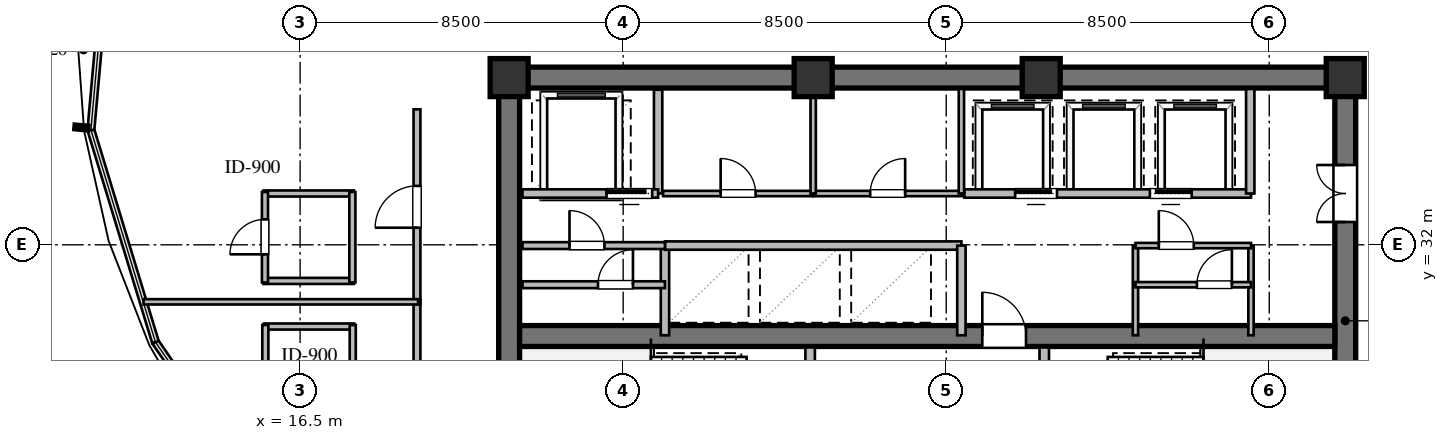
"""IFC4 building model, lengths in metres.
Left out: names, types, materials, properties, quantities, classifications, styles, units other than length and angle.
Written with IfcOpenShell. Run it as: python <this file> out.ifc"""

import sys

from ifc_helpers import new_model, si_unit, direction, frame, frame_2d, origin, origin_2d, place, context, subcontext, project, spatial, rectangle, extrude, element, fill, save


model = new_model("IFC4")
c1 = context("Model", 3, precision=1e-05, world=origin(), true_north=direction((0.0, 1.0)))
c2 = subcontext(c1, "Body", "Model", "MODEL_VIEW")
j1 = project(units=[si_unit("LENGTHUNIT", "METRE"), si_unit("PLANEANGLEUNIT", "RADIAN")], contexts=[c1])
p1 = place(None, origin())
s1 = spatial("IfcSite", under=j1, at=p1, CompositionType="ELEMENT")
p2 = place(p1, origin())
s2 = spatial("IfcBuilding", under=s1, at=p2, CompositionType="ELEMENT")
p3 = place(p2, frame((0.0, 0.0, 153.0)))
s3 = spatial("IfcBuildingStorey", under=s2, at=p3, CompositionType="ELEMENT", Elevation=153.0)
p4 = place(p3, frame((21.725, 36.4, 0.0), z_axis=(0.0, 0.0, 1.0), x_axis=(1.0, 0.0, 0.0)))
e1 = element("IfcWall", 1, at=p4, inside=s3, PredefinedType="SHEAR", context=c2, shape_type="SweptSolid", body=[
    extrude(rectangle(XDim=22.55, YDim=0.55, at=frame_2d((11.275, 0.0))), origin(), (0.0, 0.0, 1.0), 3.36),
])
p5 = place(p3, frame((22.0, 23.875, 0.0), z_axis=(0.0, 0.0, 1.0), x_axis=(0.0, 1.0, 0.0)))
e2 = element("IfcWall", 2, at=p5, inside=s3, PredefinedType="SHEAR", context=c2, shape_type="SweptSolid", body=[
    extrude(rectangle(XDim=12.25, YDim=0.55, at=frame_2d((6.125, 0.0))), origin(), (0.0, 0.0, 1.0), 3.36),
])
p6 = place(p3, frame((44.0, 23.875, 0.0), z_axis=(0.0, 0.0, 1.0), x_axis=(0.0, 1.0, 0.0)))
e3 = element("IfcWall", 3, at=p6, inside=s3, PredefinedType="SHEAR", context=c2, shape_type="SweptSolid", body=[
    extrude(rectangle(XDim=12.25, YDim=0.55, at=frame_2d((6.125, 0.0))), origin(), (0.0, 0.0, 1.0), 3.36),
])
p7 = place(p6, frame((8.725, 0.0, 0.0)))
e4 = element("IfcOpeningElement", 4, at=p7, cuts=e3, PredefinedType="OPENING", context=c2, shape_type="SweptSolid", body=[
    extrude(rectangle(XDim=1.5, YDim=2.15, at=frame_2d((0.75, 1.075))), frame((0.0, 0.285, 0.0), z_axis=(0.0, -1.0, 0.0), x_axis=(1.0, 0.0, 0.0)), (0.0, 0.0, 1.0), 0.57),
])
p8 = place(p3, frame((22.275, 29.6, 0.0), z_axis=(0.0, 0.0, 1.0), x_axis=(1.0, 0.0, 0.0)))
e5 = element("IfcWall", 5, at=p8, inside=s3, PredefinedType="SHEAR", context=c2, shape_type="SweptSolid", body=[
    extrude(rectangle(XDim=21.45, YDim=0.55, at=frame_2d((10.725, 0.0))), origin(), (0.0, 0.0, 1.0), 3.36),
])
p9 = place(p8, frame((12.175, 0.0, 0.0)))
e6 = element("IfcOpeningElement", 6, at=p9, cuts=e5, PredefinedType="OPENING", context=c2, shape_type="SweptSolid", body=[
    extrude(rectangle(XDim=1.15, YDim=2.1, at=frame_2d((0.575, 1.05))), frame((0.0, 0.285, 0.0), z_axis=(0.0, -1.0, 0.0), x_axis=(1.0, 0.0, 0.0)), (0.0, 0.0, 1.0), 0.57),
])
for number, where, z_axis, x_axis in (
    (7, (44.0, 36.4, 0.0), (0.0, 0.0, 1.0), (1.0, 0.0, 0.0)),
    (8, (36.0, 36.4, 0.0), (0.0, 0.0, 1.0), (1.0, 0.0, 0.0)),
    (9, (30.0, 36.4, 0.0), (0.0, 0.0, 1.0), (1.0, 0.0, 0.0)),
    (10, (22.0, 36.4, 0.0), (0.0, 0.0, 1.0), (1.0, 0.0, 0.0)),
):
    element("IfcColumn", number, at=place(p3, frame(where, z_axis=z_axis, x_axis=x_axis)), inside=s3, PredefinedType="COLUMN", context=c2, shape_type="SweptSolid", body=[
        extrude(rectangle(XDim=1.0, YDim=1.0, at=origin_2d()), origin(), (0.0, 0.0, 1.0), 3.6),
    ])
p10 = place(p3, frame((29.92, 23.9, 0.0), z_axis=(0.0, 0.0, 1.0), x_axis=(0.0, 1.0, 0.0)))
e11 = element("IfcWall", 11, at=p10, inside=s3, PredefinedType="SOLIDWALL", context=c2, shape_type="SweptSolid", body=[
    extrude(rectangle(XDim=5.4, YDim=0.25, at=frame_2d((2.7, 0.0))), origin(), (0.0, 0.0, 1.0), 2.806),
])
p11 = place(p10, frame((3.421, 0.0, 0.0)))
e12 = element("IfcOpeningElement", 12, at=p11, cuts=e11, PredefinedType="OPENING", context=c2, shape_type="SweptSolid", body=[
    extrude(rectangle(XDim=1.15, YDim=2.1, at=frame_2d((0.575, 1.05))), frame((0.0, 0.135, 0.0), z_axis=(0.0, -1.0, 0.0), x_axis=(1.0, 0.0, 0.0)), (0.0, 0.0, 1.0), 0.27),
])
p12 = place(p3, frame((36.08, 23.9, 0.0), z_axis=(0.0, 0.0, 1.0), x_axis=(0.0, 1.0, 0.0)))
e13 = element("IfcWall", 13, at=p12, inside=s3, PredefinedType="SOLIDWALL", context=c2, shape_type="SweptSolid", body=[
    extrude(rectangle(XDim=5.4, YDim=0.25, at=frame_2d((2.7, 0.0))), origin(), (0.0, 0.0, 1.0), 3.36),
])
p13 = place(p12, frame((3.421, 0.0, 0.0)))
e14 = element("IfcOpeningElement", 14, at=p13, cuts=e13, PredefinedType="OPENING", context=c2, shape_type="SweptSolid", body=[
    extrude(rectangle(XDim=1.15, YDim=2.1, at=frame_2d((0.575, 1.05))), frame((0.0, 0.135, 0.0), z_axis=(0.0, -1.0, 0.0), x_axis=(1.0, 0.0, 0.0)), (0.0, 0.0, 1.0), 0.27),
])
p14 = place(p3, frame((25.92, 33.35, 0.0), z_axis=(0.0, 0.0, 1.0), x_axis=(0.0, 1.0, 0.0)))
e15 = element("IfcWall", 15, at=p14, inside=s3, PredefinedType="SOLIDWALL", context=c2, shape_type="SweptSolid", body=[
    extrude(rectangle(XDim=2.73, YDim=0.22, at=frame_2d((1.365, 0.0))), origin(), (0.0, 0.0, 1.0), 3.36),
])
p15 = place(p3, frame((22.35, 33.35, 0.0), z_axis=(0.0, 0.0, 1.0), x_axis=(1.0, 0.0, 0.0)))
e16 = element("IfcWall", 16, at=p15, inside=s3, PredefinedType="SOLIDWALL", context=c2, shape_type="SweptSolid", body=[
    extrude(rectangle(XDim=3.57, YDim=0.22, at=frame_2d((1.785, 0.0))), origin(), (0.0, 0.0, 1.0), 3.36),
])
p16 = place(p15, frame((2.213, 0.0, 0.0)))
e17 = element("IfcOpeningElement", 17, at=p16, cuts=e16, PredefinedType="OPENING", context=c2, shape_type="SweptSolid", body=[
    extrude(rectangle(XDim=1.2, YDim=2.1, at=frame_2d((0.6, 1.05))), frame((0.0, 0.12, 0.0), z_axis=(0.0, -1.0, 0.0), x_axis=(1.0, 0.0, 0.0)), (0.0, 0.0, 1.0), 0.24),
])
p17 = place(p3, frame((26.1, 29.62, 0.0), z_axis=(0.0, 0.0, 1.0), x_axis=(0.0, 1.0, 0.0)))
e18 = element("IfcWall", 18, at=p17, inside=s3, PredefinedType="SOLIDWALL", context=c2, shape_type="SweptSolid", body=[
    extrude(rectangle(XDim=2.36, YDim=0.22, at=frame_2d((1.18, 0.0))), origin(), (0.0, 0.0, 1.0), 3.36),
])
p18 = place(p3, frame((26.1, 31.98, 0.0), z_axis=(0.0, 0.0, 1.0), x_axis=(1.0, 0.0, 0.0)))
e19 = element("IfcWall", 19, at=p18, inside=s3, PredefinedType="SOLIDWALL", context=c2, shape_type="SweptSolid", body=[
    extrude(rectangle(XDim=7.8, YDim=0.22, at=frame_2d((3.9, 0.0))), origin(), (0.0, 0.0, 1.0), 3.36),
])
p19 = place(p3, frame((33.9, 29.62, 0.0), z_axis=(0.0, 0.0, 1.0), x_axis=(0.0, 1.0, 0.0)))
e20 = element("IfcWall", 20, at=p19, inside=s3, PredefinedType="SOLIDWALL", context=c2, shape_type="SweptSolid", body=[
    extrude(rectangle(XDim=2.36, YDim=0.22, at=frame_2d((1.18, 0.0))), origin(), (0.0, 0.0, 1.0), 3.36),
])
p20 = place(p3, frame((26.05, 33.35, 0.0), z_axis=(0.0, 0.0, 1.0), x_axis=(1.0, 0.0, 0.0)))
e21 = element("IfcWall", 21, at=p20, inside=s3, PredefinedType="PARTITIONING", context=c2, shape_type="SweptSolid", body=[
    extrude(rectangle(XDim=3.95, YDim=0.14, at=frame_2d((1.975, 0.0))), origin(), (0.0, 0.0, 1.0), 3.36),
])
p21 = place(p20, frame((1.515, 0.0, 0.0)))
e22 = element("IfcOpeningElement", 22, at=p21, cuts=e21, PredefinedType="OPENING", context=c2, shape_type="SweptSolid", body=[
    extrude(rectangle(XDim=0.92, YDim=2.1, at=frame_2d((0.46, 1.05))), frame((0.0, 0.08, 0.0), z_axis=(0.0, -1.0, 0.0), x_axis=(1.0, 0.0, 0.0)), (0.0, 0.0, 1.0), 0.16),
])
p22 = place(p3, frame((30.0, 33.35, 0.0), z_axis=(0.0, 0.0, 1.0), x_axis=(1.0, 0.0, 0.0)))
e23 = element("IfcWall", 23, at=p22, inside=s3, PredefinedType="PARTITIONING", context=c2, shape_type="SweptSolid", body=[
    extrude(rectangle(XDim=3.92, YDim=0.14, at=frame_2d((1.96, 0.0))), origin(), (0.0, 0.0, 1.0), 3.36),
])
p23 = place(p22, frame((1.5, 0.0, 0.0)))
e24 = element("IfcOpeningElement", 24, at=p23, cuts=e23, PredefinedType="OPENING", context=c2, shape_type="SweptSolid", body=[
    extrude(rectangle(XDim=0.92, YDim=2.1, at=frame_2d((0.46, 1.05))), frame((0.0, 0.08, 0.0), z_axis=(0.0, -1.0, 0.0), x_axis=(1.0, 0.0, 0.0)), (0.0, 0.0, 1.0), 0.16),
])
for number, where, z_axis, x_axis in (
    (25, (30.0, 33.35, 0.0), (0.0, 0.0, 1.0), (0.0, 1.0, 0.0)),
    (26, (33.9, 33.35, 0.0), (0.0, 0.0, 1.0), (0.0, 1.0, 0.0)),
):
    element("IfcWall", number, at=place(p3, frame(where, z_axis=z_axis, x_axis=x_axis)), inside=s3, PredefinedType="PARTITIONING", context=c2, shape_type="SweptSolid", body=[
        extrude(rectangle(XDim=2.75, YDim=0.14, at=frame_2d((1.375, 0.0))), origin(), (0.0, 0.0, 1.0), 3.36),
    ])
p24 = place(p3, frame((33.98, 33.35, 0.0), z_axis=(0.0, 0.0, 1.0), x_axis=(1.0, 0.0, 0.0)))
e27 = element("IfcWall", 27, at=p24, inside=s3, PredefinedType="SOLIDWALL", context=c2, shape_type="SweptSolid", body=[
    extrude(rectangle(XDim=7.54, YDim=0.22, at=frame_2d((3.77, 0.0))), origin(), (0.0, 0.0, 1.0), 3.36),
])
p25 = place(p24, frame((1.335, 0.0, 0.0)))
e28 = element("IfcOpeningElement", 28, at=p25, cuts=e27, PredefinedType="OPENING", context=c2, shape_type="SweptSolid", body=[
    extrude(rectangle(XDim=1.1, YDim=2.1, at=frame_2d((0.55, 1.05))), frame((0.0, 0.12, 0.0), z_axis=(0.0, -1.0, 0.0), x_axis=(1.0, 0.0, 0.0)), (0.0, 0.0, 1.0), 0.24),
])
p26 = place(p24, frame((4.879, 0.0, 0.0)))
e29 = element("IfcOpeningElement", 29, at=p26, cuts=e27, PredefinedType="OPENING", context=c2, shape_type="SweptSolid", body=[
    extrude(rectangle(XDim=1.1, YDim=2.1, at=frame_2d((0.55, 1.05))), frame((0.0, 0.12, 0.0), z_axis=(0.0, -1.0, 0.0), x_axis=(1.0, 0.0, 0.0)), (0.0, 0.0, 1.0), 0.24),
])
p27 = place(p3, frame((41.5, 33.35, 0.0), z_axis=(0.0, 0.0, 1.0), x_axis=(0.0, 1.0, 0.0)))
e30 = element("IfcWall", 30, at=p27, inside=s3, PredefinedType="SOLIDWALL", context=c2, shape_type="SweptSolid", body=[
    extrude(rectangle(XDim=2.75, YDim=0.22, at=frame_2d((1.375, 0.0))), origin(), (0.0, 0.0, 1.0), 3.36),
])
p28 = place(p3, frame((22.35, 30.95, 0.0), z_axis=(0.0, 0.0, 1.0), x_axis=(1.0, 0.0, 0.0)))
e31 = element("IfcWall", 31, at=p28, inside=s3, PredefinedType="PARTITIONING", context=c2, shape_type="SweptSolid", body=[
    extrude(rectangle(XDim=3.75, YDim=0.18, at=frame_2d((1.875, 0.0))), origin(), (0.0, 0.0, 1.0), 3.36),
])
p29 = place(p28, frame((1.988, 0.0, 0.0)))
e32 = element("IfcOpeningElement", 32, at=p29, cuts=e31, PredefinedType="OPENING", context=c2, shape_type="SweptSolid", body=[
    extrude(rectangle(XDim=0.92, YDim=2.1, at=frame_2d((0.46, 1.05))), frame((0.0, 0.1, 0.0), z_axis=(0.0, -1.0, 0.0), x_axis=(1.0, 0.0, 0.0)), (0.0, 0.0, 1.0), 0.2),
])
p30 = place(p3, frame((22.35, 31.98, 0.0), z_axis=(0.0, 0.0, 1.0), x_axis=(1.0, 0.0, 0.0)))
e33 = element("IfcWall", 33, at=p30, inside=s3, PredefinedType="PARTITIONING", context=c2, shape_type="SweptSolid", body=[
    extrude(rectangle(XDim=3.75, YDim=0.18, at=frame_2d((1.875, 0.0))), origin(), (0.0, 0.0, 1.0), 3.36),
])
p31 = place(p30, frame((1.238, 0.0, 0.0)))
e34 = element("IfcOpeningElement", 34, at=p31, cuts=e33, PredefinedType="OPENING", context=c2, shape_type="SweptSolid", body=[
    extrude(rectangle(XDim=0.92, YDim=2.1, at=frame_2d((0.46, 1.05))), frame((0.0, 0.1, 0.0), z_axis=(0.0, -1.0, 0.0), x_axis=(1.0, 0.0, 0.0)), (0.0, 0.0, 1.0), 0.2),
])
for number, where, z_axis, x_axis in (
    (35, (38.48, 29.62, 0.0), (0.0, 0.0, 1.0), (0.0, 1.0, 0.0)),
    (36, (41.52, 29.62, 0.0), (0.0, 0.0, 1.0), (0.0, 1.0, 0.0)),
):
    element("IfcWall", number, at=place(p3, frame(where, z_axis=z_axis, x_axis=x_axis)), inside=s3, PredefinedType="PARTITIONING", context=c2, shape_type="SweptSolid", body=[
        extrude(rectangle(XDim=2.36, YDim=0.14, at=frame_2d((1.18, 0.0))), origin(), (0.0, 0.0, 1.0), 3.36),
    ])
p32 = place(p3, frame((38.48, 30.95, 0.0), z_axis=(0.0, 0.0, 1.0), x_axis=(1.0, 0.0, 0.0)))
e37 = element("IfcWall", 37, at=p32, inside=s3, PredefinedType="PARTITIONING", context=c2, shape_type="SweptSolid", body=[
    extrude(rectangle(XDim=3.04, YDim=0.14, at=frame_2d((1.52, 0.0))), origin(), (0.0, 0.0, 1.0), 3.36),
])
p33 = place(p32, frame((1.617, 0.0, 0.0)))
e38 = element("IfcOpeningElement", 38, at=p33, cuts=e37, PredefinedType="OPENING", context=c2, shape_type="SweptSolid", body=[
    extrude(rectangle(XDim=0.92, YDim=2.1, at=frame_2d((0.46, 1.05))), frame((0.0, 0.08, 0.0), z_axis=(0.0, -1.0, 0.0), x_axis=(1.0, 0.0, 0.0)), (0.0, 0.0, 1.0), 0.16),
])
p34 = place(p3, frame((38.48, 31.98, 0.0), z_axis=(0.0, 0.0, 1.0), x_axis=(1.0, 0.0, 0.0)))
e39 = element("IfcWall", 39, at=p34, inside=s3, PredefinedType="PARTITIONING", context=c2, shape_type="SweptSolid", body=[
    extrude(rectangle(XDim=3.04, YDim=0.14, at=frame_2d((1.52, 0.0))), origin(), (0.0, 0.0, 1.0), 3.36),
])
p35 = place(p34, frame((0.614, 0.0, 0.0)))
e40 = element("IfcOpeningElement", 40, at=p35, cuts=e39, PredefinedType="OPENING", context=c2, shape_type="SweptSolid", body=[
    extrude(rectangle(XDim=0.92, YDim=2.1, at=frame_2d((0.46, 1.05))), frame((0.0, 0.08, 0.0), z_axis=(0.0, -1.0, 0.0), x_axis=(1.0, 0.0, 0.0)), (0.0, 0.0, 1.0), 0.16),
])
p36 = place(p3, frame((15.545, 29.85, 0.0), z_axis=(0.0, 0.0, 1.0), x_axis=(1.0, 0.0, 0.0)))
e41 = element("IfcWall", 41, at=p36, inside=s3, PredefinedType="PLUMBINGWALL", context=c2, shape_type="SweptSolid", body=[
    extrude(rectangle(XDim=2.38, YDim=0.16, at=frame_2d((1.19, 0.0))), origin(), (0.0, 0.0, 1.0), 3.36),
])
for number, where, z_axis, x_axis in (
    (42, (15.585, 27.51, 0.0), (0.0, 0.0, 1.0), (0.0, 1.0, 0.0)),
    (43, (17.885, 27.51, 0.0), (0.0, 0.0, 1.0), (0.0, 1.0, 0.0)),
):
    element("IfcWall", number, at=place(p3, frame(where, z_axis=z_axis, x_axis=x_axis)), inside=s3, PredefinedType="PLUMBINGWALL", context=c2, shape_type="SweptSolid", body=[
        extrude(rectangle(XDim=2.38, YDim=0.16, at=frame_2d((1.19, 0.0))), origin(), (0.0, 0.0, 1.0), 3.36),
    ])
for number, where, z_axis, x_axis in (
    (44, (15.535, 31.05, 0.0), (0.0, 0.0, 1.0), (1.0, 0.0, 0.0)),
    (45, (15.535, 33.35, 0.0), (0.0, 0.0, 1.0), (1.0, 0.0, 0.0)),
):
    element("IfcWall", number, at=place(p3, frame(where, z_axis=z_axis, x_axis=x_axis)), inside=s3, PredefinedType="PLUMBINGWALL", context=c2, shape_type="SweptSolid", body=[
        extrude(rectangle(XDim=2.38, YDim=0.16, at=frame_2d((1.19, 0.0))), origin(), (0.0, 0.0, 1.0), 3.36),
    ])
p37 = place(p3, frame((15.575, 31.01, 0.0), z_axis=(0.0, 0.0, 1.0), x_axis=(0.0, 1.0, 0.0)))
e46 = element("IfcWall", 46, at=p37, inside=s3, PredefinedType="PLUMBINGWALL", context=c2, shape_type="SweptSolid", body=[
    extrude(rectangle(XDim=2.38, YDim=0.16, at=frame_2d((1.19, 0.0))), origin(), (0.0, 0.0, 1.0), 3.36),
])
p38 = place(p37, frame((0.74, 0.0, 0.0)))
e47 = element("IfcOpeningElement", 47, at=p38, cuts=e46, PredefinedType="OPENING", context=c2, shape_type="SweptSolid", body=[
    extrude(rectangle(XDim=0.92, YDim=2.1, at=frame_2d((0.46, 1.05))), frame((0.0, 0.09, 0.0), z_axis=(0.0, -1.0, 0.0), x_axis=(1.0, 0.0, 0.0)), (0.0, 0.0, 1.0), 0.18),
])
p39 = place(p3, frame((17.875, 31.01, 0.0), z_axis=(0.0, 0.0, 1.0), x_axis=(0.0, 1.0, 0.0)))
e48 = element("IfcWall", 48, at=p39, inside=s3, PredefinedType="PLUMBINGWALL", context=c2, shape_type="SweptSolid", body=[
    extrude(rectangle(XDim=2.38, YDim=0.16, at=frame_2d((1.19, 0.0))), origin(), (0.0, 0.0, 1.0), 3.36),
])
p40 = place(p3, frame((19.575, 21.775, 0.0), z_axis=(0.0, 0.0, 1.0), x_axis=(0.0, 1.0, 0.0)))
e49 = element("IfcWall", 49, at=p40, inside=s3, PredefinedType="PARTITIONING", context=c2, shape_type="SweptSolid", body=[
    extrude(rectangle(XDim=8.79, YDim=0.18, at=frame_2d((4.395, 0.0))), origin(), (0.0, 0.0, 1.0), 2.657),
])
p41 = place(p40, frame((5.175, 0.0, 0.0)))
e50 = element("IfcOpeningElement", 50, at=p41, cuts=e49, PredefinedType="OPENING", context=c2, shape_type="SweptSolid", body=[
    extrude(rectangle(XDim=1.1, YDim=2.1, at=frame_2d((0.55, 1.05))), frame((0.0, 0.1, 0.0), z_axis=(0.0, -1.0, 0.0), x_axis=(1.0, 0.0, 0.0)), (0.0, 0.0, 1.0), 0.2),
])
p42 = place(p3, frame((19.575, 30.435, 0.0), z_axis=(0.0, 0.0, 1.0), x_axis=(0.0, 1.0, 0.0)))
e51 = element("IfcWall", 51, at=p42, inside=s3, PredefinedType="PARTITIONING", context=c2, shape_type="SweptSolid", body=[
    extrude(rectangle(XDim=5.13, YDim=0.18, at=frame_2d((2.565, 0.0))), origin(), (0.0, 0.0, 1.0), 2.657),
])
p43 = place(p42, frame((2.015, 0.0, 0.0)))
e52 = element("IfcOpeningElement", 52, at=p43, cuts=e51, PredefinedType="OPENING", context=c2, shape_type="SweptSolid", body=[
    extrude(rectangle(XDim=1.1, YDim=2.1, at=frame_2d((0.55, 1.05))), frame((0.0, 0.1, 0.0), z_axis=(0.0, -1.0, 0.0), x_axis=(1.0, 0.0, 0.0)), (0.0, 0.0, 1.0), 0.2),
])
p44 = place(p3, frame((12.381, 30.5, 0.0), z_axis=(0.0, 0.0, 1.0), x_axis=(1.0, 0.0, 0.0)))
e53 = element("IfcWall", 53, at=p44, inside=s3, PredefinedType="PARTITIONING", context=c2, shape_type="SweptSolid", body=[
    extrude(rectangle(XDim=7.224, YDim=0.14, at=frame_2d((3.612, 0.0))), origin(), (0.0, 0.0, 1.0), 3.36),
])
p45 = place(p9, origin())
e54 = element("IfcDoor", 54, at=p45, inside=s3, OperationType="SINGLE_SWING_LEFT", PredefinedType="DOOR", context=c2, shape_type="SweptSolid", body=[
    extrude(rectangle(XDim=1.15, YDim=2.1, at=frame_2d((0.575, 1.05))), frame((0.0, 0.025, 0.0), z_axis=(0.0, -1.0, 0.0), x_axis=(1.0, 0.0, 0.0)), (0.0, 0.0, 1.0), 0.05),
])
fill(e6, e54)
p46 = place(p7, origin())
e55 = element("IfcDoor", 55, at=p46, inside=s3, OperationType="DOUBLE_DOOR_SINGLE_SWING", PredefinedType="DOOR", context=c2, shape_type="SweptSolid", body=[
    extrude(rectangle(XDim=1.5, YDim=2.15, at=frame_2d((0.75, 1.075))), frame((0.0, 0.025, 0.0), z_axis=(0.0, -1.0, 0.0), x_axis=(1.0, 0.0, 0.0)), (0.0, 0.0, 1.0), 0.05),
])
fill(e4, e55)
p47 = place(p16, origin())
e56 = element("IfcDoor", 56, at=p47, inside=s3, OperationType="SLIDING_TO_LEFT", PredefinedType="DOOR", context=c2, shape_type="SweptSolid", body=[
    extrude(rectangle(XDim=1.2, YDim=2.1, at=frame_2d((0.6, 1.05))), frame((0.0, 0.025, 0.0), z_axis=(0.0, -1.0, 0.0), x_axis=(1.0, 0.0, 0.0)), (0.0, 0.0, 1.0), 0.05),
])
fill(e17, e56)
p48 = place(p21, origin())
e57 = element("IfcDoor", 57, at=p48, inside=s3, OperationType="SINGLE_SWING_LEFT", PredefinedType="DOOR", context=c2, shape_type="SweptSolid", body=[
    extrude(rectangle(XDim=0.92, YDim=2.1, at=frame_2d((0.46, 1.05))), frame((0.0, 0.025, 0.0), z_axis=(0.0, -1.0, 0.0), x_axis=(1.0, 0.0, 0.0)), (0.0, 0.0, 1.0), 0.05),
])
fill(e22, e57)
p49 = place(p23, origin())
e58 = element("IfcDoor", 58, at=p49, inside=s3, OperationType="SINGLE_SWING_RIGHT", PredefinedType="DOOR", context=c2, shape_type="SweptSolid", body=[
    extrude(rectangle(XDim=0.92, YDim=2.1, at=frame_2d((0.46, 1.05))), frame((0.0, 0.025, 0.0), z_axis=(0.0, -1.0, 0.0), x_axis=(1.0, 0.0, 0.0)), (0.0, 0.0, 1.0), 0.05),
])
fill(e24, e58)
p50 = place(p25, origin())
e59 = element("IfcDoor", 59, at=p50, inside=s3, OperationType="SLIDING_TO_LEFT", PredefinedType="DOOR", context=c2, shape_type="SweptSolid", body=[
    extrude(rectangle(XDim=1.1, YDim=2.1, at=frame_2d((0.55, 1.05))), frame((0.0, 0.025, 0.0), z_axis=(0.0, -1.0, 0.0), x_axis=(1.0, 0.0, 0.0)), (0.0, 0.0, 1.0), 0.05),
])
fill(e28, e59)
p51 = place(p26, origin())
e60 = element("IfcDoor", 60, at=p51, inside=s3, OperationType="SLIDING_TO_RIGHT", PredefinedType="DOOR", context=c2, shape_type="SweptSolid", body=[
    extrude(rectangle(XDim=1.1, YDim=2.1, at=frame_2d((0.55, 1.05))), frame((0.0, 0.025, 0.0), z_axis=(0.0, -1.0, 0.0), x_axis=(1.0, 0.0, 0.0)), (0.0, 0.0, 1.0), 0.05),
])
fill(e29, e60)
p52 = place(p31, origin())
e61 = element("IfcDoor", 61, at=p52, inside=s3, OperationType="SINGLE_SWING_LEFT", PredefinedType="DOOR", context=c2, shape_type="SweptSolid", body=[
    extrude(rectangle(XDim=0.92, YDim=2.1, at=frame_2d((0.46, 1.05))), frame((0.0, 0.025, 0.0), z_axis=(0.0, -1.0, 0.0), x_axis=(1.0, 0.0, 0.0)), (0.0, 0.0, 1.0), 0.05),
])
fill(e34, e61)
p53 = place(p29, origin())
e62 = element("IfcDoor", 62, at=p53, inside=s3, OperationType="SINGLE_SWING_RIGHT", PredefinedType="DOOR", context=c2, shape_type="SweptSolid", body=[
    extrude(rectangle(XDim=0.92, YDim=2.1, at=frame_2d((0.46, 1.05))), frame((0.0, 0.025, 0.0), z_axis=(0.0, -1.0, 0.0), x_axis=(1.0, 0.0, 0.0)), (0.0, 0.0, 1.0), 0.05),
])
fill(e32, e62)
p54 = place(p35, origin())
e63 = element("IfcDoor", 63, at=p54, inside=s3, OperationType="SINGLE_SWING_LEFT", PredefinedType="DOOR", context=c2, shape_type="SweptSolid", body=[
    extrude(rectangle(XDim=0.92, YDim=2.1, at=frame_2d((0.46, 1.05))), frame((0.0, 0.025, 0.0), z_axis=(0.0, -1.0, 0.0), x_axis=(1.0, 0.0, 0.0)), (0.0, 0.0, 1.0), 0.05),
])
fill(e40, e63)
p55 = place(p33, origin())
e64 = element("IfcDoor", 64, at=p55, inside=s3, OperationType="SINGLE_SWING_RIGHT", PredefinedType="DOOR", context=c2, shape_type="SweptSolid", body=[
    extrude(rectangle(XDim=0.92, YDim=2.1, at=frame_2d((0.46, 1.05))), frame((0.0, 0.025, 0.0), z_axis=(0.0, -1.0, 0.0), x_axis=(1.0, 0.0, 0.0)), (0.0, 0.0, 1.0), 0.05),
])
fill(e38, e64)
p56 = place(p38, origin())
e65 = element("IfcDoor", 65, at=p56, inside=s3, OperationType="SINGLE_SWING_LEFT", PredefinedType="DOOR", context=c2, shape_type="SweptSolid", body=[
    extrude(rectangle(XDim=0.92, YDim=2.1, at=frame_2d((0.46, 1.05))), frame((0.0, 0.025, 0.0), z_axis=(0.0, -1.0, 0.0), x_axis=(1.0, 0.0, 0.0)), (0.0, 0.0, 1.0), 0.05),
])
fill(e47, e65)
p57 = place(p43, origin())
e66 = element("IfcDoor", 66, at=p57, inside=s3, OperationType="SINGLE_SWING_LEFT", PredefinedType="DOOR", context=c2, shape_type="SweptSolid", body=[
    extrude(rectangle(XDim=1.1, YDim=2.1, at=frame_2d((0.55, 1.05))), frame((0.0, 0.025, 0.0), z_axis=(0.0, -1.0, 0.0), x_axis=(1.0, 0.0, 0.0)), (0.0, 0.0, 1.0), 0.05),
])
fill(e52, e66)
save(model, sys.argv[1])
